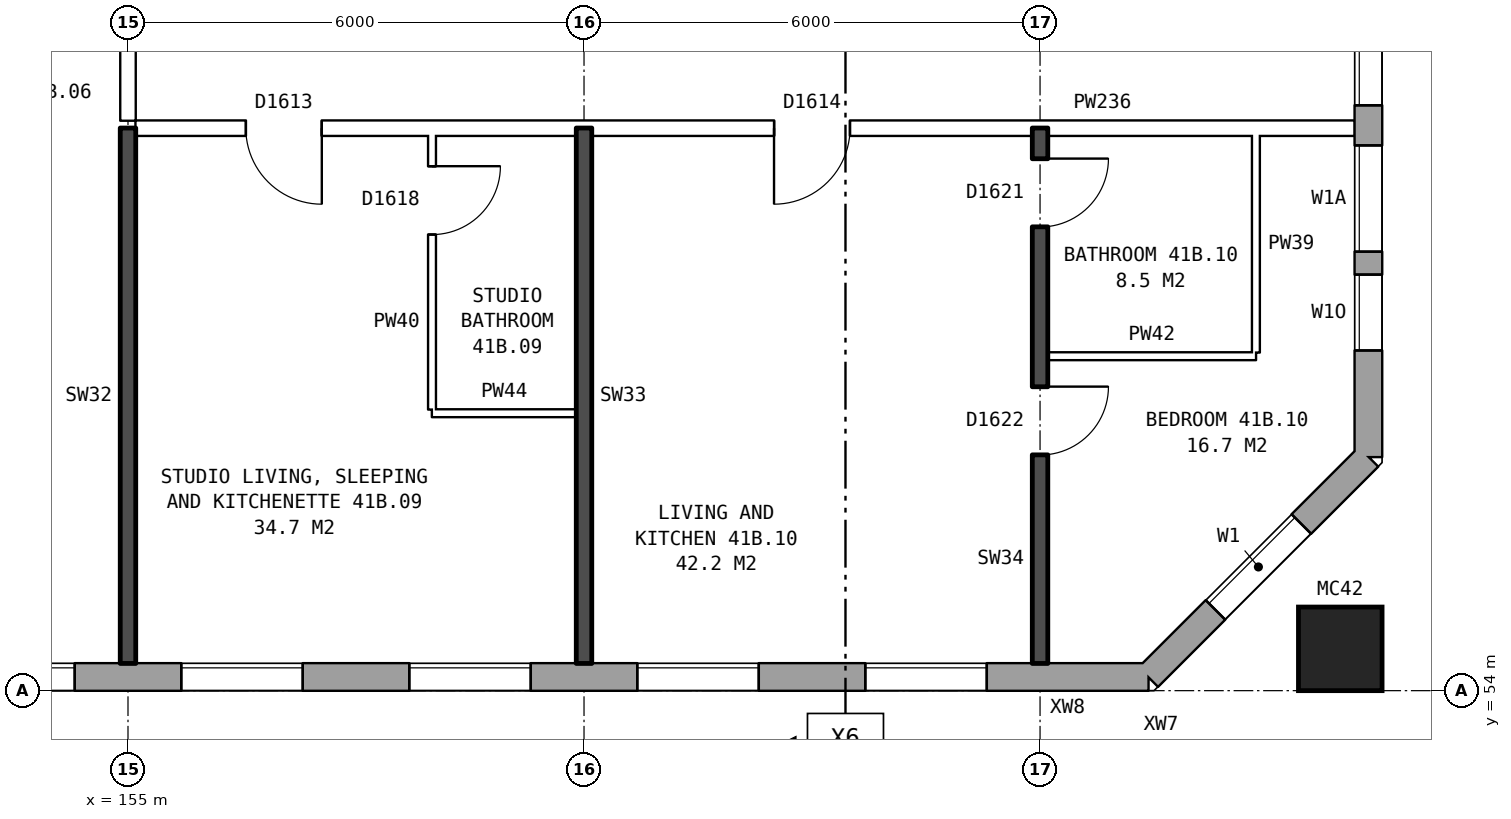
"""IFC4 building model, lengths in metres.
Left out: names, types, materials, properties, quantities, classifications, styles, units other than length and angle.
Written with IfcOpenShell. Run it as: python <this file> out.ifc"""

import sys

from ifc_helpers import new_model, si_unit, direction, frame, frame_2d, origin, origin_2d, place, context, subcontext, project, spatial, rectangle, hollow_rectangle, extrude, element, fill, save


model = new_model("IFC4")
c1 = context("Model", 3, precision=1e-05, world=origin(), true_north=direction((0.0, 1.0)))
c2 = subcontext(c1, "Body", "Model", "MODEL_VIEW")
j1 = project(units=[si_unit("LENGTHUNIT", "METRE"), si_unit("PLANEANGLEUNIT", "RADIAN")], contexts=[c1])
p1 = place(None, origin())
s1 = spatial("IfcSite", under=j1, at=p1, CompositionType="ELEMENT")
p2 = place(p1, origin())
s2 = spatial("IfcBuilding", under=s1, at=p2, CompositionType="ELEMENT")
p3 = place(p2, frame((0.0, 0.0, 148.5)))
s3 = spatial("IfcBuildingStorey", under=s2, at=p3, CompositionType="ELEMENT", Elevation=148.5)
p4 = place(p3, frame((170.95, 54.55, 0.0), z_axis=(0.0, 0.0, 1.0), x_axis=(1.0, 0.0, 0.0)))
e1 = element("IfcColumn", 1, at=p4, inside=s3, PredefinedType="COLUMN", context=c2, shape_type="SweptSolid", body=[
    extrude(hollow_rectangle(XDim=1.1, YDim=1.1, WallThickness=0.06, at=origin_2d()), origin(), (0.0, 0.0, 1.0), 3.1),
])
p5 = place(p3, frame((134.075, 54.18, 0.0), z_axis=(0.0, 0.0, 1.0), x_axis=(1.0, 0.0, 0.0)))
e2 = element("IfcWall", 2, at=p5, inside=s3, PredefinedType="STANDARD", context=c2, shape_type="SweptSolid", body=[
    extrude(rectangle(XDim=34.351, YDim=0.36, at=frame_2d((17.175, 0.0))), origin(), (0.0, 0.0, 1.0), 2.85),
])
p6 = place(p5, frame((0.625, 0.0, 0.8)))
e3 = element("IfcOpeningElement", 3, at=p6, cuts=e2, PredefinedType="OPENING", context=c2, shape_type="SweptSolid", body=[
    extrude(rectangle(XDim=1.6, YDim=1.8, at=frame_2d((0.8, 0.9))), frame((0.0, 0.19, 0.0), z_axis=(0.0, -1.0, 0.0), x_axis=(1.0, 0.0, 0.0)), (0.0, 0.0, 1.0), 0.38),
])
p7 = place(p5, frame((3.625, 0.0, 0.8)))
e4 = element("IfcOpeningElement", 4, at=p7, cuts=e2, PredefinedType="OPENING", context=c2, shape_type="SweptSolid", body=[
    extrude(rectangle(XDim=1.6, YDim=1.8, at=frame_2d((0.8, 0.9))), frame((0.0, 0.19, 0.0), z_axis=(0.0, -1.0, 0.0), x_axis=(1.0, 0.0, 0.0)), (0.0, 0.0, 1.0), 0.38),
])
p8 = place(p5, frame((6.625, 0.0, 0.8)))
e5 = element("IfcOpeningElement", 5, at=p8, cuts=e2, PredefinedType="OPENING", context=c2, shape_type="SweptSolid", body=[
    extrude(rectangle(XDim=1.6, YDim=1.8, at=frame_2d((0.8, 0.9))), frame((0.0, 0.19, 0.0), z_axis=(0.0, -1.0, 0.0), x_axis=(1.0, 0.0, 0.0)), (0.0, 0.0, 1.0), 0.38),
])
p9 = place(p5, frame((9.625, 0.0, 0.8)))
e6 = element("IfcOpeningElement", 6, at=p9, cuts=e2, PredefinedType="OPENING", context=c2, shape_type="SweptSolid", body=[
    extrude(rectangle(XDim=1.6, YDim=1.8, at=frame_2d((0.8, 0.9))), frame((0.0, 0.19, 0.0), z_axis=(0.0, -1.0, 0.0), x_axis=(1.0, 0.0, 0.0)), (0.0, 0.0, 1.0), 0.38),
])
p10 = place(p5, frame((12.625, 0.0, 0.8)))
e7 = element("IfcOpeningElement", 7, at=p10, cuts=e2, PredefinedType="OPENING", context=c2, shape_type="SweptSolid", body=[
    extrude(rectangle(XDim=1.6, YDim=1.8, at=frame_2d((0.8, 0.9))), frame((0.0, 0.19, 0.0), z_axis=(0.0, -1.0, 0.0), x_axis=(1.0, 0.0, 0.0)), (0.0, 0.0, 1.0), 0.38),
])
p11 = place(p5, frame((15.625, 0.0, 0.8)))
e8 = element("IfcOpeningElement", 8, at=p11, cuts=e2, PredefinedType="OPENING", context=c2, shape_type="SweptSolid", body=[
    extrude(rectangle(XDim=1.6, YDim=1.8, at=frame_2d((0.8, 0.9))), frame((0.0, 0.19, 0.0), z_axis=(0.0, -1.0, 0.0), x_axis=(1.0, 0.0, 0.0)), (0.0, 0.0, 1.0), 0.38),
])
p12 = place(p5, frame((18.625, 0.0, 0.8)))
e9 = element("IfcOpeningElement", 9, at=p12, cuts=e2, PredefinedType="OPENING", context=c2, shape_type="SweptSolid", body=[
    extrude(rectangle(XDim=1.6, YDim=1.8, at=frame_2d((0.8, 0.9))), frame((0.0, 0.19, 0.0), z_axis=(0.0, -1.0, 0.0), x_axis=(1.0, 0.0, 0.0)), (0.0, 0.0, 1.0), 0.38),
])
p13 = place(p5, frame((21.625, 0.0, 0.8)))
e10 = element("IfcOpeningElement", 10, at=p13, cuts=e2, PredefinedType="OPENING", context=c2, shape_type="SweptSolid", body=[
    extrude(rectangle(XDim=1.6, YDim=1.8, at=frame_2d((0.8, 0.9))), frame((0.0, 0.19, 0.0), z_axis=(0.0, -1.0, 0.0), x_axis=(1.0, 0.0, 0.0)), (0.0, 0.0, 1.0), 0.38),
])
p14 = place(p5, frame((24.625, 0.0, 0.8)))
e11 = element("IfcOpeningElement", 11, at=p14, cuts=e2, PredefinedType="OPENING", context=c2, shape_type="SweptSolid", body=[
    extrude(rectangle(XDim=1.6, YDim=1.8, at=frame_2d((0.8, 0.9))), frame((0.0, 0.19, 0.0), z_axis=(0.0, -1.0, 0.0), x_axis=(1.0, 0.0, 0.0)), (0.0, 0.0, 1.0), 0.38),
])
p15 = place(p5, frame((27.625, 0.0, 0.8)))
e12 = element("IfcOpeningElement", 12, at=p15, cuts=e2, PredefinedType="OPENING", context=c2, shape_type="SweptSolid", body=[
    extrude(rectangle(XDim=1.6, YDim=1.8, at=frame_2d((0.8, 0.9))), frame((0.0, 0.19, 0.0), z_axis=(0.0, -1.0, 0.0), x_axis=(1.0, 0.0, 0.0)), (0.0, 0.0, 1.0), 0.38),
])
p16 = place(p5, frame((30.625, 0.0, 0.8)))
e13 = element("IfcOpeningElement", 13, at=p16, cuts=e2, PredefinedType="OPENING", context=c2, shape_type="SweptSolid", body=[
    extrude(rectangle(XDim=1.6, YDim=1.8, at=frame_2d((0.8, 0.9))), frame((0.0, 0.19, 0.0), z_axis=(0.0, -1.0, 0.0), x_axis=(1.0, 0.0, 0.0)), (0.0, 0.0, 1.0), 0.38),
])
p17 = place(p3, frame((168.425, 54.18, 0.0), z_axis=(0.0, 0.0, 1.0), x_axis=(0.707106781187, 0.707106781187, 0.0)))
e14 = element("IfcWall", 14, at=p17, inside=s3, PredefinedType="STANDARD", context=c2, shape_type="SweptSolid", body=[
    extrude(rectangle(XDim=4.094, YDim=0.36, at=frame_2d((2.047, 0.0))), origin(), (0.0, 0.0, 1.0), 2.85),
])
p18 = place(p17, frame((1.247, 0.0, 0.8)))
e15 = element("IfcOpeningElement", 15, at=p18, cuts=e14, PredefinedType="OPENING", context=c2, shape_type="SweptSolid", body=[
    extrude(rectangle(XDim=1.6, YDim=1.8, at=frame_2d((0.8, 0.9))), frame((0.0, 0.19, 0.0), z_axis=(0.0, -1.0, 0.0), x_axis=(1.0, 0.0, 0.0)), (0.0, 0.0, 1.0), 0.38),
])
p19 = place(p3, frame((171.32, 57.075, 0.0), z_axis=(0.0, 0.0, 1.0), x_axis=(0.0, 1.0, 0.0)))
e16 = element("IfcWall", 16, at=p19, inside=s3, PredefinedType="STANDARD", context=c2, shape_type="SweptSolid", body=[
    extrude(rectangle(XDim=25.851, YDim=0.36, at=frame_2d((12.925, 0.0))), origin(), (0.0, 0.0, 1.0), 2.85),
])
p20 = place(p19, frame((1.4, 0.0, 0.8)))
e17 = element("IfcOpeningElement", 17, at=p20, cuts=e16, PredefinedType="OPENING", context=c2, shape_type="SweptSolid", body=[
    extrude(rectangle(XDim=1.0, YDim=1.2, at=frame_2d((0.5, 0.6))), frame((0.0, 0.19, 0.0), z_axis=(0.0, -1.0, 0.0), x_axis=(1.0, 0.0, 0.0)), (0.0, 0.0, 1.0), 0.38),
])
p21 = place(p19, frame((4.625, 0.0, 0.8)))
e18 = element("IfcOpeningElement", 18, at=p21, cuts=e16, PredefinedType="OPENING", context=c2, shape_type="SweptSolid", body=[
    extrude(rectangle(XDim=1.6, YDim=1.8, at=frame_2d((0.8, 0.9))), frame((0.0, 0.19, 0.0), z_axis=(0.0, -1.0, 0.0), x_axis=(1.0, 0.0, 0.0)), (0.0, 0.0, 1.0), 0.38),
])
p22 = place(p19, frame((7.625, 0.0, 0.8)))
e19 = element("IfcOpeningElement", 19, at=p22, cuts=e16, PredefinedType="OPENING", context=c2, shape_type="SweptSolid", body=[
    extrude(rectangle(XDim=1.6, YDim=1.8, at=frame_2d((0.8, 0.9))), frame((0.0, 0.19, 0.0), z_axis=(0.0, -1.0, 0.0), x_axis=(1.0, 0.0, 0.0)), (0.0, 0.0, 1.0), 0.38),
])
p23 = place(p19, frame((10.625, 0.0, 0.8)))
e20 = element("IfcOpeningElement", 20, at=p23, cuts=e16, PredefinedType="OPENING", context=c2, shape_type="SweptSolid", body=[
    extrude(rectangle(XDim=1.6, YDim=1.8, at=frame_2d((0.8, 0.9))), frame((0.0, 0.19, 0.0), z_axis=(0.0, -1.0, 0.0), x_axis=(1.0, 0.0, 0.0)), (0.0, 0.0, 1.0), 0.38),
])
p24 = place(p19, frame((13.625, 0.0, 0.8)))
e21 = element("IfcOpeningElement", 21, at=p24, cuts=e16, PredefinedType="OPENING", context=c2, shape_type="SweptSolid", body=[
    extrude(rectangle(XDim=1.6, YDim=1.8, at=frame_2d((0.8, 0.9))), frame((0.0, 0.19, 0.0), z_axis=(0.0, -1.0, 0.0), x_axis=(1.0, 0.0, 0.0)), (0.0, 0.0, 1.0), 0.38),
])
p25 = place(p19, frame((16.625, 0.0, 0.8)))
e22 = element("IfcOpeningElement", 22, at=p25, cuts=e16, PredefinedType="OPENING", context=c2, shape_type="SweptSolid", body=[
    extrude(rectangle(XDim=1.6, YDim=1.8, at=frame_2d((0.8, 0.9))), frame((0.0, 0.19, 0.0), z_axis=(0.0, -1.0, 0.0), x_axis=(1.0, 0.0, 0.0)), (0.0, 0.0, 1.0), 0.38),
])
p26 = place(p19, frame((19.625, 0.0, 0.8)))
e23 = element("IfcOpeningElement", 23, at=p26, cuts=e16, PredefinedType="OPENING", context=c2, shape_type="SweptSolid", body=[
    extrude(rectangle(XDim=1.6, YDim=1.8, at=frame_2d((0.8, 0.9))), frame((0.0, 0.19, 0.0), z_axis=(0.0, -1.0, 0.0), x_axis=(1.0, 0.0, 0.0)), (0.0, 0.0, 1.0), 0.38),
])
p27 = place(p19, frame((21.725, 0.0, 0.8)))
e24 = element("IfcOpeningElement", 24, at=p27, cuts=e16, PredefinedType="OPENING", context=c2, shape_type="SweptSolid", body=[
    extrude(rectangle(XDim=1.4, YDim=1.8, at=frame_2d((0.7, 0.9))), frame((0.0, 0.19, 0.0), z_axis=(0.0, -1.0, 0.0), x_axis=(1.0, 0.0, 0.0)), (0.0, 0.0, 1.0), 0.38),
])
p28 = place(p19, frame((2.7, 0.0, 0.8)))
e25 = element("IfcOpeningElement", 25, at=p28, cuts=e16, PredefinedType="OPENING", context=c2, shape_type="SweptSolid", body=[
    extrude(rectangle(XDim=1.4, YDim=1.8, at=frame_2d((0.7, 0.9))), frame((0.0, 0.19, 0.0), z_axis=(0.0, -1.0, 0.0), x_axis=(1.0, 0.0, 0.0)), (0.0, 0.0, 1.0), 0.38),
])
p29 = place(p19, frame((23.425, 0.0, 0.8)))
e26 = element("IfcOpeningElement", 26, at=p29, cuts=e16, PredefinedType="OPENING", context=c2, shape_type="SweptSolid", body=[
    extrude(rectangle(XDim=1.0, YDim=1.2, at=frame_2d((0.5, 0.6))), frame((0.0, 0.19, 0.0), z_axis=(0.0, -1.0, 0.0), x_axis=(1.0, 0.0, 0.0)), (0.0, 0.0, 1.0), 0.38),
])
p30 = place(p3, frame((159.0, 57.65, 0.0), z_axis=(0.0, 0.0, 1.0), x_axis=(1.0, 0.0, 0.0)))
e27 = element("IfcWall", 27, at=p30, inside=s3, PredefinedType="PARTITIONING", context=c2, shape_type="SweptSolid", body=[
    extrude(rectangle(XDim=1.9, YDim=0.1, at=frame_2d((0.95, 0.0))), origin(), (0.0, 0.0, 1.0), 2.85),
])
p31 = place(p3, frame((167.1, 58.4, 0.0), z_axis=(0.0, 0.0, 1.0), x_axis=(1.0, 0.0, 0.0)))
e28 = element("IfcWall", 28, at=p31, inside=s3, PredefinedType="PARTITIONING", context=c2, shape_type="SweptSolid", body=[
    extrude(rectangle(XDim=2.74, YDim=0.1, at=frame_2d((1.37, 0.0))), origin(), (0.0, 0.0, 1.0), 2.85),
])
p32 = place(p3, frame((155.1, 61.4, 0.0), z_axis=(0.0, 0.0, 1.0), x_axis=(1.0, 0.0, 0.0)))
e29 = element("IfcWall", 29, at=p32, inside=s3, PredefinedType="PARTITIONING", context=c2, shape_type="SweptSolid", body=[
    extrude(rectangle(XDim=16.04, YDim=0.2, at=frame_2d((8.02, 0.0))), origin(), (0.0, 0.0, 1.0), 2.85),
])
p33 = place(p32, frame((1.45, 0.0, 0.0)))
e30 = element("IfcOpeningElement", 30, at=p33, cuts=e29, PredefinedType="OPENING", context=c2, shape_type="SweptSolid", body=[
    extrude(rectangle(XDim=1.0, YDim=2.1, at=frame_2d((0.5, 1.05))), frame((0.0, 0.11, 0.0), z_axis=(0.0, -1.0, 0.0), x_axis=(1.0, 0.0, 0.0)), (0.0, 0.0, 1.0), 0.22),
])
p34 = place(p32, frame((8.4, 0.0, 0.0)))
e31 = element("IfcOpeningElement", 31, at=p34, cuts=e29, PredefinedType="OPENING", context=c2, shape_type="SweptSolid", body=[
    extrude(rectangle(XDim=1.0, YDim=2.1, at=frame_2d((0.5, 1.05))), frame((0.0, 0.11, 0.0), z_axis=(0.0, -1.0, 0.0), x_axis=(1.0, 0.0, 0.0)), (0.0, 0.0, 1.0), 0.22),
])
p35 = place(p3, frame((155.0, 54.36, 0.0), z_axis=(0.0, 0.0, 1.0), x_axis=(0.0, 1.0, 0.0)))
e32 = element("IfcWall", 32, at=p35, inside=s3, PredefinedType="SOLIDWALL", context=c2, shape_type="SweptSolid", body=[
    extrude(rectangle(XDim=7.04, YDim=0.2, at=frame_2d((3.52, 0.0))), origin(), (0.0, 0.0, 1.0), 2.85),
])
p36 = place(p3, frame((155.0, 61.5, 0.0), z_axis=(0.0, 0.0, 1.0), x_axis=(0.0, 1.0, 0.0)))
e33 = element("IfcWall", 33, at=p36, inside=s3, PredefinedType="PARTITIONING", context=c2, shape_type="SweptSolid", body=[
    extrude(rectangle(XDim=2.2, YDim=0.2, at=frame_2d((1.1, 0.0))), origin(), (0.0, 0.0, 1.0), 2.85),
])
p37 = place(p3, frame((159.0, 57.7, 0.0), z_axis=(0.0, 0.0, 1.0), x_axis=(0.0, 1.0, 0.0)))
e34 = element("IfcWall", 34, at=p37, inside=s3, PredefinedType="PARTITIONING", context=c2, shape_type="SweptSolid", body=[
    extrude(rectangle(XDim=3.6, YDim=0.1, at=frame_2d((1.8, 0.0))), origin(), (0.0, 0.0, 1.0), 2.85),
])
p38 = place(p37, frame((2.3, 0.0, 0.0)))
e35 = element("IfcOpeningElement", 35, at=p38, cuts=e34, PredefinedType="OPENING", context=c2, shape_type="SweptSolid", body=[
    extrude(rectangle(XDim=0.9, YDim=2.1, at=frame_2d((0.45, 1.05))), frame((0.0, 0.06, 0.0), z_axis=(0.0, -1.0, 0.0), x_axis=(1.0, 0.0, 0.0)), (0.0, 0.0, 1.0), 0.12),
])
p39 = place(p3, frame((161.0, 54.36, 0.0), z_axis=(0.0, 0.0, 1.0), x_axis=(0.0, 1.0, 0.0)))
e36 = element("IfcWall", 36, at=p39, inside=s3, PredefinedType="SOLIDWALL", context=c2, shape_type="SweptSolid", body=[
    extrude(rectangle(XDim=7.04, YDim=0.2, at=frame_2d((3.52, 0.0))), origin(), (0.0, 0.0, 1.0), 2.85),
])
p40 = place(p3, frame((167.0, 54.36, 0.0), z_axis=(0.0, 0.0, 1.0), x_axis=(0.0, 1.0, 0.0)))
e37 = element("IfcWall", 37, at=p40, inside=s3, PredefinedType="SOLIDWALL", context=c2, shape_type="SweptSolid", body=[
    extrude(rectangle(XDim=7.04, YDim=0.2, at=frame_2d((3.52, 0.0))), origin(), (0.0, 0.0, 1.0), 2.85),
])
p41 = place(p40, frame((2.74, 0.0, 0.0)))
e38 = element("IfcOpeningElement", 38, at=p41, cuts=e37, PredefinedType="OPENING", context=c2, shape_type="SweptSolid", body=[
    extrude(rectangle(XDim=0.9, YDim=2.1, at=frame_2d((0.45, 1.05))), frame((0.0, 0.11, 0.0), z_axis=(0.0, -1.0, 0.0), x_axis=(1.0, 0.0, 0.0)), (0.0, 0.0, 1.0), 0.22),
])
p42 = place(p40, frame((5.74, 0.0, 0.0)))
e39 = element("IfcOpeningElement", 39, at=p42, cuts=e37, PredefinedType="OPENING", context=c2, shape_type="SweptSolid", body=[
    extrude(rectangle(XDim=0.9, YDim=2.1, at=frame_2d((0.45, 1.05))), frame((0.0, 0.11, 0.0), z_axis=(0.0, -1.0, 0.0), x_axis=(1.0, 0.0, 0.0)), (0.0, 0.0, 1.0), 0.22),
])
p43 = place(p3, frame((169.84, 58.45, 0.0), z_axis=(0.0, 0.0, 1.0), x_axis=(0.0, 1.0, 0.0)))
e40 = element("IfcWall", 40, at=p43, inside=s3, PredefinedType="PARTITIONING", context=c2, shape_type="SweptSolid", body=[
    extrude(rectangle(XDim=2.85, YDim=0.1, at=frame_2d((1.425, 0.0))), origin(), (0.0, 0.0, 1.0), 2.85),
])
p44 = place(p12, origin())
e41 = element("IfcWindow", 41, at=p44, inside=s3, PartitioningType="SINGLE_PANEL", PredefinedType="WINDOW", context=c2, shape_type="SweptSolid", body=[
    extrude(rectangle(XDim=1.6, YDim=1.8, at=frame_2d((0.8, 0.9))), frame((0.0, 0.15, 0.0), z_axis=(0.0, -1.0, 0.0), x_axis=(1.0, 0.0, 0.0)), (0.0, 0.0, 1.0), 0.06),
])
fill(e9, e41)
p45 = place(p13, origin())
e42 = element("IfcWindow", 42, at=p45, inside=s3, PartitioningType="SINGLE_PANEL", PredefinedType="WINDOW", context=c2, shape_type="SweptSolid", body=[
    extrude(rectangle(XDim=1.6, YDim=1.8, at=frame_2d((0.8, 0.9))), frame((0.0, 0.15, 0.0), z_axis=(0.0, -1.0, 0.0), x_axis=(1.0, 0.0, 0.0)), (0.0, 0.0, 1.0), 0.06),
])
fill(e10, e42)
p46 = place(p14, origin())
e43 = element("IfcWindow", 43, at=p46, inside=s3, PartitioningType="SINGLE_PANEL", PredefinedType="WINDOW", context=c2, shape_type="SweptSolid", body=[
    extrude(rectangle(XDim=1.6, YDim=1.8, at=frame_2d((0.8, 0.9))), frame((0.0, 0.15, 0.0), z_axis=(0.0, -1.0, 0.0), x_axis=(1.0, 0.0, 0.0)), (0.0, 0.0, 1.0), 0.06),
])
fill(e11, e43)
p47 = place(p15, origin())
e44 = element("IfcWindow", 44, at=p47, inside=s3, PartitioningType="SINGLE_PANEL", PredefinedType="WINDOW", context=c2, shape_type="SweptSolid", body=[
    extrude(rectangle(XDim=1.6, YDim=1.8, at=frame_2d((0.8, 0.9))), frame((0.0, 0.15, 0.0), z_axis=(0.0, -1.0, 0.0), x_axis=(1.0, 0.0, 0.0)), (0.0, 0.0, 1.0), 0.06),
])
fill(e12, e44)
p48 = place(p16, origin())
e45 = element("IfcWindow", 45, at=p48, inside=s3, PartitioningType="SINGLE_PANEL", PredefinedType="WINDOW", context=c2, shape_type="SweptSolid", body=[
    extrude(rectangle(XDim=1.6, YDim=1.8, at=frame_2d((0.8, 0.9))), frame((0.0, 0.15, 0.0), z_axis=(0.0, -1.0, 0.0), x_axis=(1.0, 0.0, 0.0)), (0.0, 0.0, 1.0), 0.06),
])
fill(e13, e45)
p49 = place(p18, origin())
e46 = element("IfcWindow", 46, at=p49, inside=s3, PartitioningType="SINGLE_PANEL", PredefinedType="WINDOW", context=c2, shape_type="SweptSolid", body=[
    extrude(rectangle(XDim=1.6, YDim=1.8, at=frame_2d((0.8, 0.9))), frame((0.0, 0.15, 0.0), z_axis=(0.0, -1.0, 0.0), x_axis=(1.0, 0.0, 0.0)), (0.0, 0.0, 1.0), 0.06),
])
fill(e15, e46)
p50 = place(p20, origin())
e47 = element("IfcWindow", 47, at=p50, inside=s3, PartitioningType="SINGLE_PANEL", PredefinedType="WINDOW", context=c2, shape_type="SweptSolid", body=[
    extrude(rectangle(XDim=1.0, YDim=1.2, at=frame_2d((0.5, 0.6))), frame((0.0, 0.15, 0.0), z_axis=(0.0, -1.0, 0.0), x_axis=(1.0, 0.0, 0.0)), (0.0, 0.0, 1.0), 0.06),
])
fill(e17, e47)
p51 = place(p21, origin())
e48 = element("IfcWindow", 48, at=p51, inside=s3, PartitioningType="SINGLE_PANEL", PredefinedType="WINDOW", context=c2, shape_type="SweptSolid", body=[
    extrude(rectangle(XDim=1.6, YDim=1.8, at=frame_2d((0.8, 0.9))), frame((0.0, 0.15, 0.0), z_axis=(0.0, -1.0, 0.0), x_axis=(1.0, 0.0, 0.0)), (0.0, 0.0, 1.0), 0.06),
])
fill(e18, e48)
p52 = place(p33, frame((1.0, 0.0, 0.0), z_axis=(0.0, 0.0, 1.0), x_axis=(-1.0, 0.0, 0.0)))
e49 = element("IfcDoor", 49, at=p52, inside=s3, OperationType="SINGLE_SWING_LEFT", PredefinedType="DOOR", context=c2, shape_type="SweptSolid", body=[
    extrude(rectangle(XDim=1.0, YDim=2.1, at=frame_2d((0.5, 1.05))), frame((0.0, 0.025, 0.0), z_axis=(0.0, -1.0, 0.0), x_axis=(1.0, 0.0, 0.0)), (0.0, 0.0, 1.0), 0.05),
])
fill(e30, e49)
p53 = place(p38, frame((0.9, 0.0, 0.0), z_axis=(0.0, 0.0, 1.0), x_axis=(-1.0, 0.0, 0.0)))
e50 = element("IfcDoor", 50, at=p53, inside=s3, OperationType="SINGLE_SWING_LEFT", PredefinedType="DOOR", context=c2, shape_type="SweptSolid", body=[
    extrude(rectangle(XDim=0.9, YDim=2.1, at=frame_2d((0.45, 1.05))), frame((0.0, 0.025, 0.0), z_axis=(0.0, -1.0, 0.0), x_axis=(1.0, 0.0, 0.0)), (0.0, 0.0, 1.0), 0.05),
])
fill(e35, e50)
p54 = place(p41, frame((0.9, 0.0, 0.0), z_axis=(0.0, 0.0, 1.0), x_axis=(-1.0, 0.0, 0.0)))
e51 = element("IfcDoor", 51, at=p54, inside=s3, OperationType="SINGLE_SWING_LEFT", PredefinedType="DOOR", context=c2, shape_type="SweptSolid", body=[
    extrude(rectangle(XDim=0.9, YDim=2.1, at=frame_2d((0.45, 1.05))), frame((0.0, 0.025, 0.0), z_axis=(0.0, -1.0, 0.0), x_axis=(1.0, 0.0, 0.0)), (0.0, 0.0, 1.0), 0.05),
])
fill(e38, e51)
p55 = place(p34, frame((1.0, 0.0, 0.0), z_axis=(0.0, 0.0, 1.0), x_axis=(-1.0, 0.0, 0.0)))
e52 = element("IfcDoor", 52, at=p55, inside=s3, OperationType="SINGLE_SWING_RIGHT", PredefinedType="DOOR", context=c2, shape_type="SweptSolid", body=[
    extrude(rectangle(XDim=1.0, YDim=2.1, at=frame_2d((0.5, 1.05))), frame((0.0, 0.025, 0.0), z_axis=(0.0, -1.0, 0.0), x_axis=(1.0, 0.0, 0.0)), (0.0, 0.0, 1.0), 0.05),
])
fill(e31, e52)
p56 = place(p42, frame((0.9, 0.0, 0.0), z_axis=(0.0, 0.0, 1.0), x_axis=(-1.0, 0.0, 0.0)))
e53 = element("IfcDoor", 53, at=p56, inside=s3, OperationType="SINGLE_SWING_LEFT", PredefinedType="DOOR", context=c2, shape_type="SweptSolid", body=[
    extrude(rectangle(XDim=0.9, YDim=2.1, at=frame_2d((0.45, 1.05))), frame((0.0, 0.025, 0.0), z_axis=(0.0, -1.0, 0.0), x_axis=(1.0, 0.0, 0.0)), (0.0, 0.0, 1.0), 0.05),
])
fill(e39, e53)
p57 = place(p28, origin())
e54 = element("IfcWindow", 54, at=p57, inside=s3, PartitioningType="SINGLE_PANEL", PredefinedType="WINDOW", context=c2, shape_type="SweptSolid", body=[
    extrude(rectangle(XDim=1.4, YDim=1.8, at=frame_2d((0.7, 0.9))), frame((0.0, 0.15, 0.0), z_axis=(0.0, -1.0, 0.0), x_axis=(1.0, 0.0, 0.0)), (0.0, 0.0, 1.0), 0.06),
])
fill(e25, e54)
save(model, sys.argv[1])
